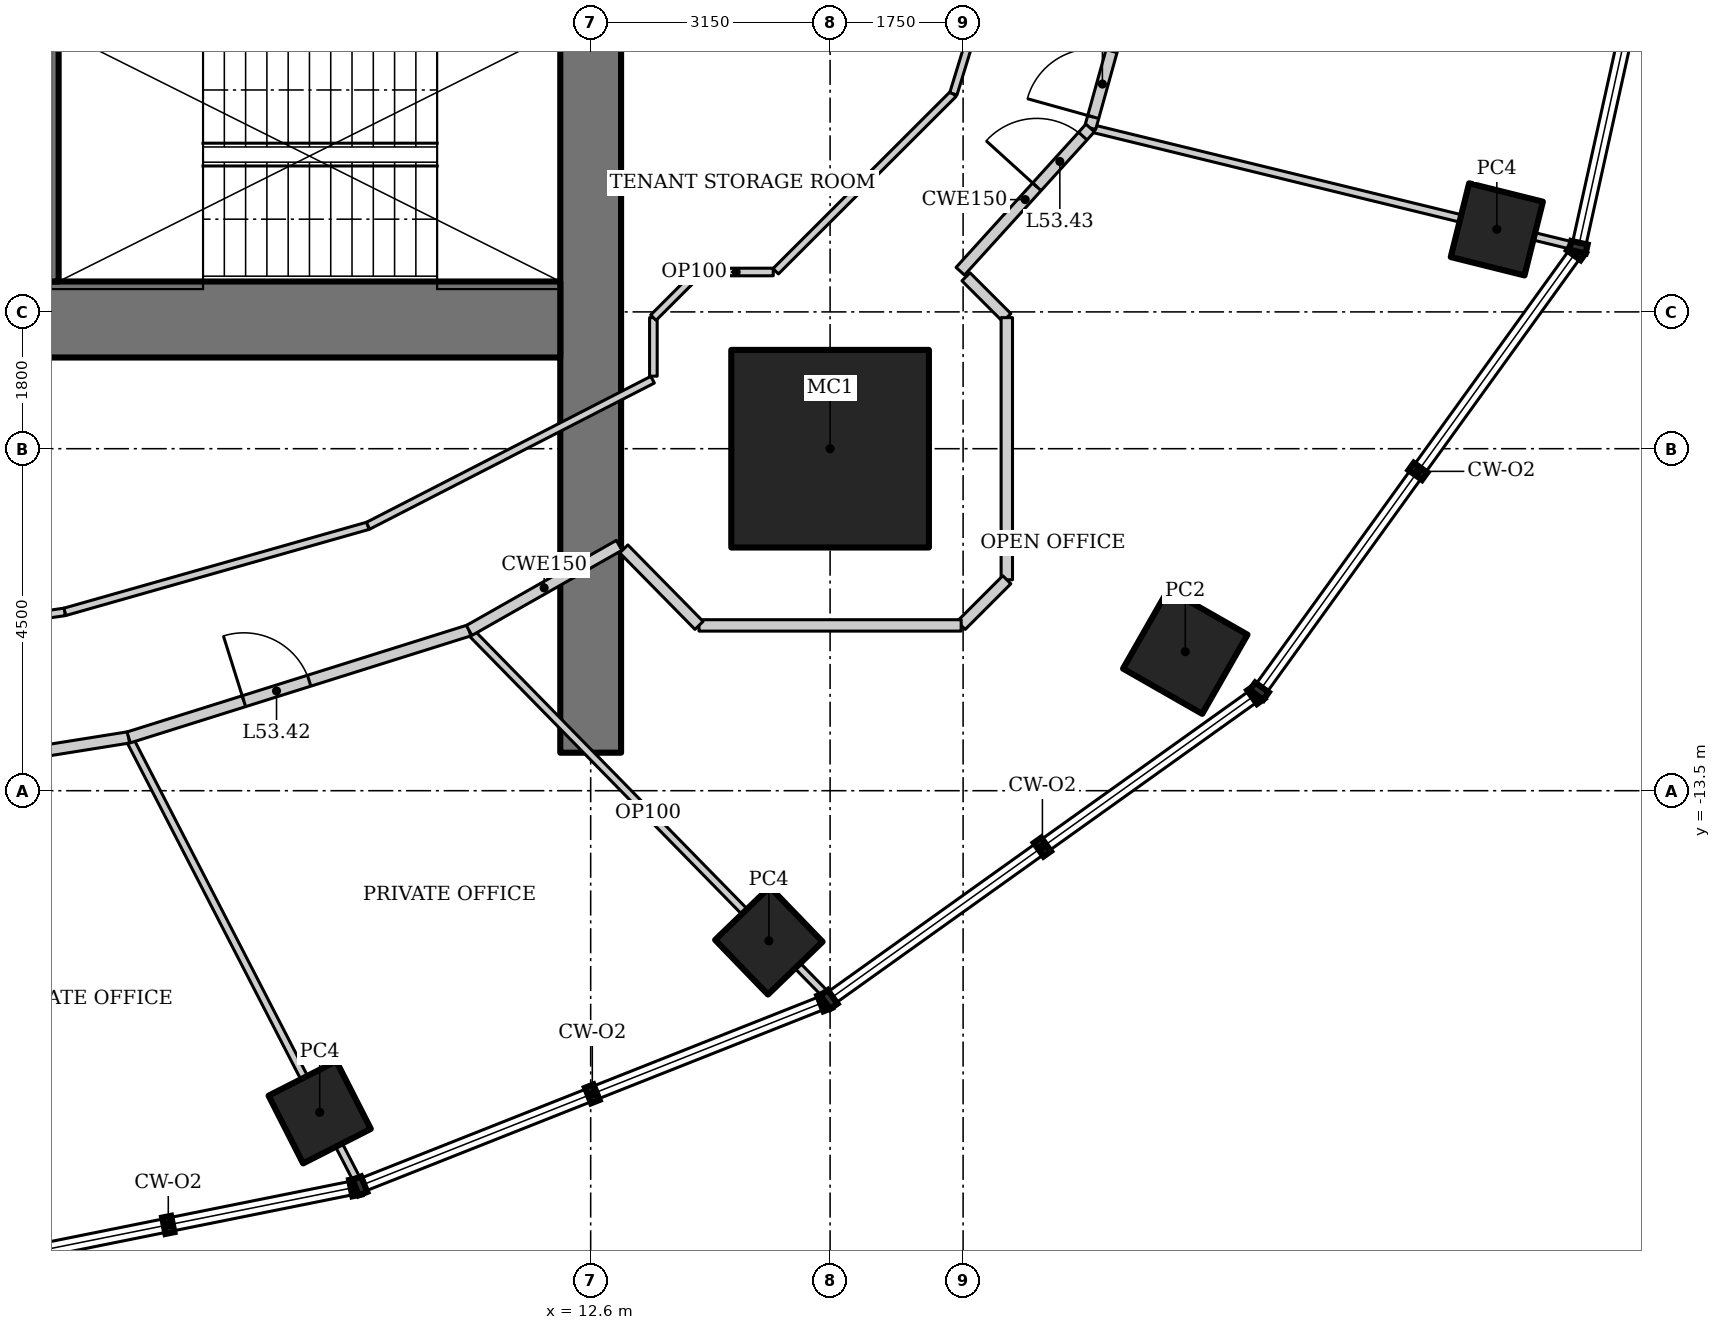
"""IFC4 building model, lengths in metres.
Left out: names, types, materials, properties, quantities, classifications, styles, units other than length and angle.
Written with IfcOpenShell. Run it as: python <this file> out.ifc"""

import sys

from ifc_helpers import new_model, si_unit, direction, frame, frame_2d, origin, origin_2d, place, context, subcontext, project, spatial, rectangle, hollow_rectangle, extrude, element, fill, save


model = new_model("IFC4")
c1 = context("Model", 3, precision=1e-05, world=origin(), true_north=direction((0.0, 1.0)))
c2 = subcontext(c1, "Body", "Model", "MODEL_VIEW")
j1 = project(units=[si_unit("LENGTHUNIT", "METRE"), si_unit("PLANEANGLEUNIT", "RADIAN")], contexts=[c1])
p1 = place(None, origin())
s1 = spatial("IfcSite", under=j1, at=p1, CompositionType="ELEMENT")
p2 = place(p1, origin())
s2 = spatial("IfcBuilding", under=s1, at=p2, CompositionType="ELEMENT")
p3 = place(p2, frame((0.0, 0.0, 228.4)))
s3 = spatial("IfcBuildingStorey", under=s2, at=p3, CompositionType="ELEMENT", Elevation=228.4)
p4 = place(p3, frame((15.75, -9.0, 0.0), z_axis=(0.0, 0.0, 1.0), x_axis=(1.0, 0.0, 0.0)))
e1 = element("IfcColumn", 1, at=p4, inside=s3, PredefinedType="COLUMN", context=c2, shape_type="SweptSolid", body=[
    extrude(hollow_rectangle(XDim=2.6, YDim=2.6, WallThickness=0.13, at=origin_2d()), origin(), (0.0, 0.0, 1.0), 4.2),
])
for number, where, z_axis, x_axis in (
    (2, (9.035, -17.731, 0.0), (0.0, 0.0, 1.0), (0.891, 0.454, 0.0)),
    (3, (14.944, -15.475, 0.0), (0.0, 0.0, 1.0), (0.719, 0.695, 0.0)),
):
    element("IfcColumn", number, at=place(p3, frame(where, z_axis=z_axis, x_axis=x_axis)), inside=s3, PredefinedType="COLUMN", context=c2, shape_type="SweptSolid", body=[
        extrude(hollow_rectangle(XDim=1.0, YDim=1.0, WallThickness=0.08, at=origin_2d()), origin(), (0.0, 0.0, 1.0), 4.2),
    ])
p5 = place(p3, frame((20.423, -11.67, 0.0), z_axis=(0.0, 0.0, 1.0), x_axis=(0.496139221777, 0.86824298017, 0.0)))
e4 = element("IfcColumn", 4, at=p5, inside=s3, PredefinedType="COLUMN", context=c2, shape_type="SweptSolid", body=[
    extrude(hollow_rectangle(XDim=1.2, YDim=1.2, WallThickness=0.1, at=origin_2d()), origin(), (0.0, 0.0, 1.0), 4.2),
])
p6 = place(p3, frame((24.522, -6.114, 0.0), z_axis=(0.0, 0.0, 1.0), x_axis=(0.2419218956, 0.970295726276, 0.0)))
e5 = element("IfcColumn", 5, at=p6, inside=s3, PredefinedType="COLUMN", context=c2, shape_type="SweptSolid", body=[
    extrude(hollow_rectangle(XDim=1.0, YDim=1.0, WallThickness=0.08, at=origin_2d()), origin(), (0.0, 0.0, 1.0), 4.2),
])
p7 = place(p3, frame((12.6, -13.0, 0.0), z_axis=(0.0, 0.0, 1.0), x_axis=(0.0, 1.0, 0.0)))
e6 = element("IfcWall", 6, at=p7, inside=s3, PredefinedType="SHEAR", context=c2, shape_type="SweptSolid", body=[
    extrude(rectangle(XDim=26.0, YDim=0.8, at=frame_2d((13.0, 0.0))), origin(), (0.0, 0.0, 1.0), 4.2),
])
p8 = place(p7, frame((12.1, 0.0, 0.0)))
e7 = element("IfcOpeningElement", 7, at=p8, cuts=e6, PredefinedType="OPENING", context=c2, shape_type="SweptSolid", body=[
    extrude(rectangle(XDim=1.8, YDim=2.1, at=frame_2d((0.9, 1.05))), frame((0.0, 0.41, 0.0), z_axis=(0.0, -1.0, 0.0), x_axis=(1.0, 0.0, 0.0)), (0.0, 0.0, 1.0), 0.82),
])
p9 = place(p3, frame((-12.2, -7.3, 0.0), z_axis=(0.0, 0.0, 1.0), x_axis=(1.0, 0.0, 0.0)))
e8 = element("IfcWall", 8, at=p9, inside=s3, PredefinedType="SHEAR", context=c2, shape_type="SweptSolid", body=[
    extrude(rectangle(XDim=24.4, YDim=1.0, at=frame_2d((12.2, 0.0))), origin(), (0.0, 0.0, 1.0), 4.2),
])
p10 = place(p3, frame((5.4, -6.8, 0.0), z_axis=(0.0, 0.0, 1.0), x_axis=(0.0, 1.0, 0.0)))
e9 = element("IfcWall", 9, at=p10, inside=s3, PredefinedType="SHEAR", context=c2, shape_type="SweptSolid", body=[
    extrude(rectangle(XDim=14.6, YDim=0.4, at=frame_2d((7.3, 0.0))), origin(), (0.0, 0.0, 1.0), 4.2),
])
p11 = place(p10, frame((5.9, 0.0, 0.0)))
e10 = element("IfcOpeningElement", 10, at=p11, cuts=e9, PredefinedType="OPENING", context=c2, shape_type="SweptSolid", body=[
    extrude(rectangle(XDim=1.8, YDim=2.1, at=frame_2d((0.9, 1.05))), frame((0.0, 0.21, 0.0), z_axis=(0.0, -1.0, 0.0), x_axis=(1.0, 0.0, 0.0)), (0.0, 0.0, 1.0), 0.42),
])
p12 = place(p3, frame((9.54, -18.65, 0.0), z_axis=(0.0, 0.0, 1.0), x_axis=(-0.458420942987, 0.888735190611, 0.0)))
e11 = element("IfcWall", 11, at=p12, inside=s3, PredefinedType="PARTITIONING", context=c2, shape_type="SweptSolid", body=[
    extrude(rectangle(XDim=6.584, YDim=0.1, at=frame_2d((3.292, 0.0))), origin(), (0.0, 0.0, 1.0), 3.293),
])
p13 = place(p3, frame((15.709, -16.199, 0.0), z_axis=(0.0, 0.0, 1.0), x_axis=(-0.699758297028, 0.71437967898, 0.0)))
e12 = element("IfcWall", 12, at=p13, inside=s3, PredefinedType="PARTITIONING", context=c2, shape_type="SweptSolid", body=[
    extrude(rectangle(XDim=6.729, YDim=0.1, at=frame_2d((3.365, 0.0))), origin(), (0.0, 0.0, 1.0), 3.41),
])
p14 = place(p3, frame((25.543, -6.335, 0.0), z_axis=(0.0, 0.0, 1.0), x_axis=(-0.971467850621, 0.237171278215, 0.0)))
e13 = element("IfcWall", 13, at=p14, inside=s3, PredefinedType="PARTITIONING", context=c2, shape_type="SweptSolid", body=[
    extrude(rectangle(XDim=6.558, YDim=0.1, at=frame_2d((3.279, 0.0))), origin(), (0.0, 0.0, 1.0), 3.108),
])
p15 = place(p3, frame((3.081, -13.347, 0.0), z_axis=(0.0, 0.0, 1.0), x_axis=(0.987554093087, 0.157279729233, 0.0)))
e14 = element("IfcWall", 14, at=p15, inside=s3, PredefinedType="PARTITIONING", context=c2, shape_type="SweptSolid", body=[
    extrude(rectangle(XDim=3.483, YDim=0.15, at=frame_2d((1.742, 0.0))), origin(), (0.0, 0.0, 1.0), 4.05),
])
p16 = place(p15, frame((0.15, 0.0, 0.0)))
e15 = element("IfcOpeningElement", 15, at=p16, cuts=e14, PredefinedType="OPENING", context=c2, shape_type="SweptSolid", body=[
    extrude(rectangle(XDim=0.9, YDim=2.1, at=frame_2d((0.45, 1.05))), frame((0.0, 0.085, 0.0), z_axis=(0.0, -1.0, 0.0), x_axis=(1.0, 0.0, 0.0)), (0.0, 0.0, 1.0), 0.17),
])
p17 = place(p3, frame((6.521, -12.799, 0.0), z_axis=(0.0, 0.0, 1.0), x_axis=(0.954031103669, 0.299707612903, 0.0)))
e16 = element("IfcWall", 16, at=p17, inside=s3, PredefinedType="PARTITIONING", context=c2, shape_type="SweptSolid", body=[
    extrude(rectangle(XDim=4.695, YDim=0.15, at=frame_2d((2.348, 0.0))), origin(), (0.0, 0.0, 1.0), 4.05),
])
p18 = place(p17, frame((1.589, 0.0, 0.0)))
e17 = element("IfcOpeningElement", 17, at=p18, cuts=e16, PredefinedType="OPENING", context=c2, shape_type="SweptSolid", body=[
    extrude(rectangle(XDim=0.9, YDim=2.1, at=frame_2d((0.45, 1.05))), frame((0.0, 0.085, 0.0), z_axis=(0.0, -1.0, 0.0), x_axis=(1.0, 0.0, 0.0)), (0.0, 0.0, 1.0), 0.17),
])
p19 = place(p3, frame((19.172, -4.78, 0.0), z_axis=(0.0, 0.0, 1.0), x_axis=(0.26770731566, 0.963500281859, 0.0)))
e18 = element("IfcWall", 18, at=p19, inside=s3, PredefinedType="PARTITIONING", context=c2, shape_type="SweptSolid", body=[
    extrude(rectangle(XDim=4.961, YDim=0.15, at=frame_2d((2.48, 0.0))), origin(), (0.0, 0.0, 1.0), 4.05),
])
p20 = place(p19, frame((0.15, 0.0, 0.0)))
e19 = element("IfcOpeningElement", 19, at=p20, cuts=e18, PredefinedType="OPENING", context=c2, shape_type="SweptSolid", body=[
    extrude(rectangle(XDim=0.9, YDim=2.1, at=frame_2d((0.45, 1.05))), frame((0.0, 0.085, 0.0), z_axis=(0.0, -1.0, 0.0), x_axis=(1.0, 0.0, 0.0)), (0.0, 0.0, 1.0), 0.17),
])
p21 = place(p3, frame((9.67, -10.014, 0.0), z_axis=(0.0, 0.0, 1.0), x_axis=(-0.961973498971, -0.273142796496, 0.0)))
e20 = element("IfcWall", 20, at=p21, inside=s3, PredefinedType="PARTITIONING", context=c2, shape_type="SweptSolid", body=[
    extrude(rectangle(XDim=4.148, YDim=0.1, at=frame_2d((2.074, 0.0))), origin(), (0.0, 0.0, 1.0), 4.05),
])
p22 = place(p3, frame((5.68, -11.147, 0.0), z_axis=(0.0, 0.0, 1.0), x_axis=(-0.989797891768, -0.142478536811, 0.0)))
e21 = element("IfcWall", 21, at=p22, inside=s3, PredefinedType="PARTITIONING", context=c2, shape_type="SweptSolid", body=[
    extrude(rectangle(XDim=0.485, YDim=0.1, at=frame_2d((0.242, 0.0))), origin(), (0.0, 0.0, 1.0), 4.05),
])
p23 = place(p3, frame((11.001, -11.392, 0.0), z_axis=(0.0, 0.0, 1.0), x_axis=(0.869722107117, 0.493541747366, 0.0)))
e22 = element("IfcWall", 22, at=p23, inside=s3, PredefinedType="PARTITIONING", context=c2, shape_type="SweptSolid", body=[
    extrude(rectangle(XDim=2.27, YDim=0.15, at=frame_2d((1.135, 0.0))), origin(), (0.0, 0.0, 1.0), 4.05),
])
p24 = place(p3, frame((17.463, -6.665, 0.0), z_axis=(0.0, 0.0, 1.0), x_axis=(0.671721890643, 0.74080341632, 0.0)))
e23 = element("IfcWall", 23, at=p24, inside=s3, PredefinedType="PARTITIONING", context=c2, shape_type="SweptSolid", body=[
    extrude(rectangle(XDim=2.544, YDim=0.15, at=frame_2d((1.272, 0.0))), origin(), (0.0, 0.0, 1.0), 4.05),
])
p25 = place(p24, frame((1.5, 0.0, 0.0)))
e24 = element("IfcOpeningElement", 24, at=p25, cuts=e23, PredefinedType="OPENING", context=c2, shape_type="SweptSolid", body=[
    extrude(rectangle(XDim=0.9, YDim=2.1, at=frame_2d((0.45, 1.05))), frame((0.0, 0.085, 0.0), z_axis=(0.0, -1.0, 0.0), x_axis=(1.0, 0.0, 0.0)), (0.0, 0.0, 1.0), 0.17),
])
p26 = place(p3, frame((17.372, -4.331, 0.0), z_axis=(0.0, 0.0, 1.0), x_axis=(-0.707587114823, -0.70662612104, 0.0)))
e25 = element("IfcWall", 25, at=p26, inside=s3, PredefinedType="PARTITIONING", context=c2, shape_type="SweptSolid", body=[
    extrude(rectangle(XDim=3.303, YDim=0.1, at=frame_2d((1.651, 0.0))), origin(), (0.0, 0.0, 1.0), 4.05),
])
p27 = place(p3, frame((13.415, -8.092, 0.0), z_axis=(0.0, 0.0, 1.0), x_axis=(-0.889620520549, -0.45670048108, 0.0)))
e26 = element("IfcWall", 26, at=p27, inside=s3, PredefinedType="PARTITIONING", context=c2, shape_type="SweptSolid", body=[
    extrude(rectangle(XDim=4.209, YDim=0.1, at=frame_2d((2.104, 0.0))), origin(), (0.0, 0.0, 1.0), 4.05),
])
p28 = place(p3, frame((13.425, -8.046, 0.0), z_axis=(0.0, 0.0, 1.0), x_axis=(0.0, 1.0, 0.0)))
e27 = element("IfcWall", 27, at=p28, inside=s3, PredefinedType="PARTITIONING", context=c2, shape_type="SweptSolid", body=[
    extrude(rectangle(XDim=0.77, YDim=0.1, at=frame_2d((0.385, 0.0))), origin(), (0.0, 0.0, 1.0), 4.05),
])
p29 = place(p3, frame((13.425, -7.275, 0.0), z_axis=(0.0, 0.0, 1.0), x_axis=(0.707106781187, 0.707106781187, 0.0)))
e28 = element("IfcWall", 28, at=p29, inside=s3, PredefinedType="PARTITIONING", context=c2, shape_type="SweptSolid", body=[
    extrude(rectangle(XDim=0.849, YDim=0.1, at=frame_2d((0.425, 0.0))), origin(), (0.0, 0.0, 1.0), 4.05),
])
p30 = place(p3, frame((14.025, -6.675, 0.0), z_axis=(0.0, 0.0, 1.0), x_axis=(1.0, 0.0, 0.0)))
e29 = element("IfcWall", 29, at=p30, inside=s3, PredefinedType="PARTITIONING", context=c2, shape_type="SweptSolid", body=[
    extrude(rectangle(XDim=0.977, YDim=0.1, at=frame_2d((0.488, 0.0))), origin(), (0.0, 0.0, 1.0), 4.05),
])
p31 = place(p3, frame((17.538, -6.738, 0.0), z_axis=(0.0, 0.0, 1.0), x_axis=(0.707106781187, -0.707106781187, 0.0)))
e30 = element("IfcWall", 30, at=p31, inside=s3, PredefinedType="PARTITIONING", context=c2, shape_type="SweptSolid", body=[
    extrude(rectangle(XDim=0.76, YDim=0.15, at=frame_2d((0.38, 0.0))), origin(), (0.0, 0.0, 1.0), 4.05),
])
p32 = place(p3, frame((18.075, -7.275, 0.0), z_axis=(0.0, 0.0, 1.0), x_axis=(0.0, -1.0, 0.0)))
e31 = element("IfcWall", 31, at=p32, inside=s3, PredefinedType="PARTITIONING", context=c2, shape_type="SweptSolid", body=[
    extrude(rectangle(XDim=3.449, YDim=0.15, at=frame_2d((1.725, 0.0))), origin(), (0.0, 0.0, 1.0), 3.601),
])
p33 = place(p3, frame((18.075, -10.725, 0.0), z_axis=(0.0, 0.0, 1.0), x_axis=(-0.707106781187, -0.707106781187, 0.0)))
e32 = element("IfcWall", 32, at=p33, inside=s3, PredefinedType="PARTITIONING", context=c2, shape_type="SweptSolid", body=[
    extrude(rectangle(XDim=0.849, YDim=0.15, at=frame_2d((0.425, 0.0))), origin(), (0.0, 0.0, 1.0), 4.05),
])
p34 = place(p3, frame((17.475, -11.325, 0.0), z_axis=(0.0, 0.0, 1.0), x_axis=(-1.0, 0.0, 0.0)))
e33 = element("IfcWall", 33, at=p34, inside=s3, PredefinedType="PARTITIONING", context=c2, shape_type="SweptSolid", body=[
    extrude(rectangle(XDim=3.449, YDim=0.15, at=frame_2d((1.725, 0.0))), origin(), (0.0, 0.0, 1.0), 4.05),
])
p35 = place(p3, frame((14.025, -11.325, 0.0), z_axis=(0.0, 0.0, 1.0), x_axis=(-0.701113567316, 0.713049623606, 0.0)))
e34 = element("IfcWall", 34, at=p35, inside=s3, PredefinedType="PARTITIONING", context=c2, shape_type="SweptSolid", body=[
    extrude(rectangle(XDim=1.411, YDim=0.15, at=frame_2d((0.706, 0.0))), origin(), (0.0, 0.0, 1.0), 4.05),
])
p36 = place(p3, frame((17.984, -2.335, 0.0), z_axis=(0.0, 0.0, 1.0), x_axis=(-0.293231279211, -0.956041535129, 0.0)))
e35 = element("IfcWall", 35, at=p36, inside=s3, PredefinedType="PARTITIONING", context=c2, shape_type="SweptSolid", body=[
    extrude(rectangle(XDim=2.088, YDim=0.1, at=frame_2d((1.044, 0.0))), origin(), (0.0, 0.0, 1.0), 4.05),
])
p37 = place(p18, origin())
e36 = element("IfcDoor", 36, at=p37, inside=s3, OperationType="SINGLE_SWING_LEFT", PredefinedType="DOOR", context=c2, shape_type="SweptSolid", body=[
    extrude(rectangle(XDim=0.9, YDim=2.1, at=frame_2d((0.45, 1.05))), frame((0.0, 0.025, 0.0), z_axis=(0.0, -1.0, 0.0), x_axis=(1.0, 0.0, 0.0)), (0.0, 0.0, 1.0), 0.05),
])
fill(e17, e36)
p38 = place(p25, origin())
e37 = element("IfcDoor", 37, at=p38, inside=s3, OperationType="SINGLE_SWING_LEFT", PredefinedType="DOOR", context=c2, shape_type="SweptSolid", body=[
    extrude(rectangle(XDim=0.9, YDim=2.1, at=frame_2d((0.45, 1.05))), frame((0.0, 0.025, 0.0), z_axis=(0.0, -1.0, 0.0), x_axis=(1.0, 0.0, 0.0)), (0.0, 0.0, 1.0), 0.05),
])
fill(e24, e37)
p39 = place(p20, origin())
e38 = element("IfcDoor", 38, at=p39, inside=s3, OperationType="SINGLE_SWING_LEFT", PredefinedType="DOOR", context=c2, shape_type="SweptSolid", body=[
    extrude(rectangle(XDim=0.9, YDim=2.1, at=frame_2d((0.45, 1.05))), frame((0.0, 0.025, 0.0), z_axis=(0.0, -1.0, 0.0), x_axis=(1.0, 0.0, 0.0)), (0.0, 0.0, 1.0), 0.05),
])
fill(e19, e38)
save(model, sys.argv[1])
